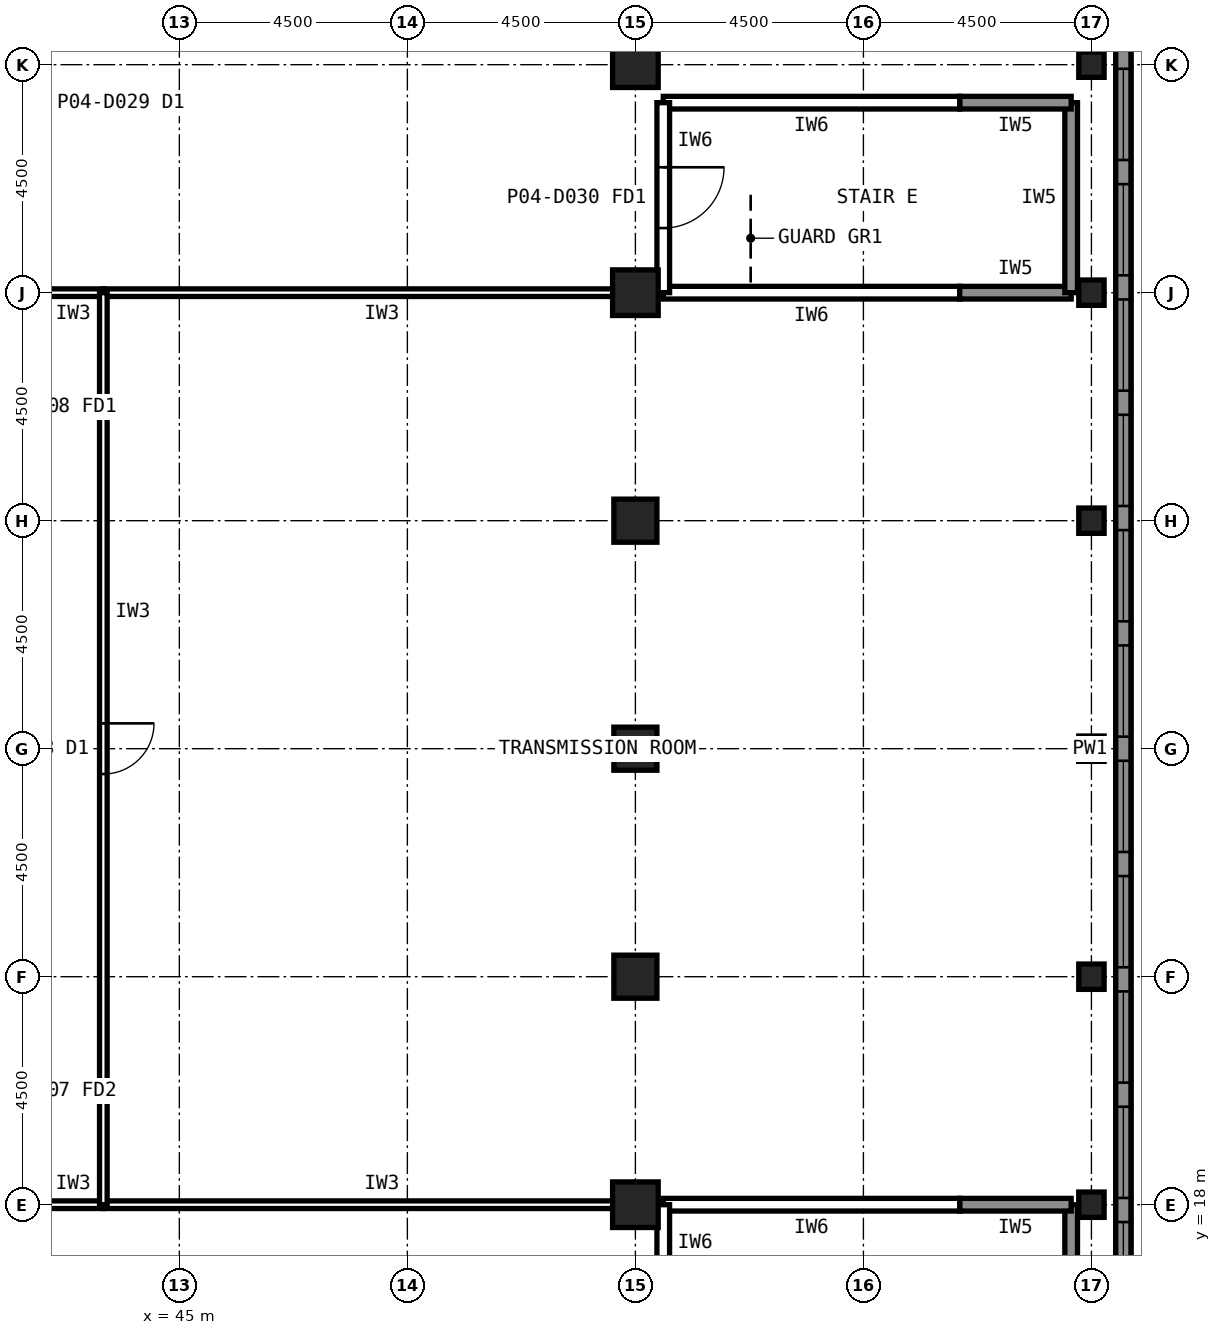
"""IFC4 building model, lengths in metres.
Left out: names, types, materials, properties, quantities, classifications, styles, units other than length and angle.
Written with IfcOpenShell. Run it as: python <this file> out.ifc"""

import sys

from ifc_helpers import new_model, si_unit, direction, frame, frame_2d, origin, origin_2d, place, context, subcontext, project, spatial, rectangle, hollow_rectangle, extrude, element, fill, save


model = new_model("IFC4")
c1 = context("Model", 3, precision=1e-05, world=origin(), true_north=direction((0.0, 1.0)))
c2 = subcontext(c1, "Body", "Model", "MODEL_VIEW")
j1 = project(units=[si_unit("LENGTHUNIT", "METRE"), si_unit("PLANEANGLEUNIT", "RADIAN")], contexts=[c1])
p1 = place(None, origin())
s1 = spatial("IfcSite", under=j1, at=p1, CompositionType="ELEMENT")
p2 = place(p1, origin())
s2 = spatial("IfcBuilding", under=s1, at=p2, CompositionType="ELEMENT")
p3 = place(p2, frame((0.0, 0.0, 18.0)))
s3 = spatial("IfcBuildingStorey", under=s2, at=p3, CompositionType="ELEMENT", Elevation=18.0)
p4 = place(p3, frame((54.0, 18.0, 0.0), z_axis=(0.0, 0.0, 1.0), x_axis=(1.0, 0.0, 0.0)))
e1 = element("IfcColumn", 1, at=p4, inside=s3, PredefinedType="COLUMN", context=c2, shape_type="SweptSolid", body=[
    extrude(hollow_rectangle(XDim=0.9, YDim=0.9, WallThickness=0.063, at=origin_2d()), origin(), (0.0, 0.0, 1.0), 5.0),
])
for number, where, z_axis, x_axis in (
    (2, (54.0, 22.5, 0.0), (0.0, 0.0, 1.0), (1.0, 0.0, 0.0)),
    (3, (54.0, 27.0, 0.0), (0.0, 0.0, 1.0), (1.0, 0.0, 0.0)),
    (4, (54.0, 31.5, 0.0), (0.0, 0.0, 1.0), (1.0, 0.0, 0.0)),
):
    element("IfcColumn", number, at=place(p3, frame(where, z_axis=z_axis, x_axis=x_axis)), inside=s3, PredefinedType="COLUMN", context=c2, shape_type="SweptSolid", body=[
        extrude(hollow_rectangle(XDim=0.85, YDim=0.85, WallThickness=0.05, at=origin_2d()), origin(), (0.0, 0.0, 1.0), 5.0),
    ])
for number, where, z_axis, x_axis in (
    (5, (54.0, 36.0, 0.0), (0.0, 0.0, 1.0), (1.0, 0.0, 0.0)),
    (6, (54.0, 40.5, 0.0), (0.0, 0.0, 1.0), (1.0, 0.0, 0.0)),
):
    element("IfcColumn", number, at=place(p3, frame(where, z_axis=z_axis, x_axis=x_axis)), inside=s3, PredefinedType="COLUMN", context=c2, shape_type="SweptSolid", body=[
        extrude(hollow_rectangle(XDim=0.9, YDim=0.9, WallThickness=0.063, at=origin_2d()), origin(), (0.0, 0.0, 1.0), 5.0),
    ])
for number, where, z_axis, x_axis in (
    (7, (63.0, 18.0, 0.0), (0.0, 0.0, 1.0), (1.0, 0.0, 0.0)),
    (8, (63.0, 22.5, 0.0), (0.0, 0.0, 1.0), (1.0, 0.0, 0.0)),
    (9, (63.0, 27.0, 0.0), (0.0, 0.0, 1.0), (1.0, 0.0, 0.0)),
    (10, (63.0, 31.5, 0.0), (0.0, 0.0, 1.0), (1.0, 0.0, 0.0)),
    (11, (63.0, 36.0, 0.0), (0.0, 0.0, 1.0), (1.0, 0.0, 0.0)),
    (12, (63.0, 40.5, 0.0), (0.0, 0.0, 1.0), (1.0, 0.0, 0.0)),
):
    element("IfcColumn", number, at=place(p3, frame(where, z_axis=z_axis, x_axis=x_axis)), inside=s3, PredefinedType="COLUMN", context=c2, shape_type="SweptSolid", body=[
        extrude(hollow_rectangle(XDim=0.5, YDim=0.5, WallThickness=0.022, at=origin_2d()), origin(), (0.0, 0.0, 1.0), 5.0),
    ])
p5 = place(p3, frame((63.63, 49.761, 0.0), z_axis=(0.0, 0.0, 1.0), x_axis=(0.0, -1.0, 0.0)))
e13 = element("IfcWall", 13, at=p5, inside=s3, PredefinedType="SOLIDWALL", context=c2, shape_type="SweptSolid", body=[
    extrude(rectangle(XDim=45.522, YDim=0.3, at=frame_2d((22.761, 0.0))), origin(), (0.0, 0.0, 1.0), 5.0),
])
p6 = place(p5, frame((2.514, 0.0, 1.1)))
e14 = element("IfcOpeningElement", 14, at=p6, cuts=e13, PredefinedType="OPENING", context=c2, shape_type="SweptSolid", body=[
    extrude(rectangle(XDim=1.8, YDim=1.2, at=frame_2d((0.9, 0.6))), frame((0.0, 0.16, 0.0), z_axis=(0.0, -1.0, 0.0), x_axis=(1.0, 0.0, 0.0)), (0.0, 0.0, 1.0), 0.32),
])
p7 = place(p5, frame((4.79, 0.0, 1.1)))
e15 = element("IfcOpeningElement", 15, at=p7, cuts=e13, PredefinedType="OPENING", context=c2, shape_type="SweptSolid", body=[
    extrude(rectangle(XDim=1.8, YDim=1.2, at=frame_2d((0.9, 0.6))), frame((0.0, 0.16, 0.0), z_axis=(0.0, -1.0, 0.0), x_axis=(1.0, 0.0, 0.0)), (0.0, 0.0, 1.0), 0.32),
])
p8 = place(p5, frame((7.066, 0.0, 1.1)))
e16 = element("IfcOpeningElement", 16, at=p8, cuts=e13, PredefinedType="OPENING", context=c2, shape_type="SweptSolid", body=[
    extrude(rectangle(XDim=1.8, YDim=1.2, at=frame_2d((0.9, 0.6))), frame((0.0, 0.16, 0.0), z_axis=(0.0, -1.0, 0.0), x_axis=(1.0, 0.0, 0.0)), (0.0, 0.0, 1.0), 0.32),
])
p9 = place(p5, frame((9.343, 0.0, 1.1)))
e17 = element("IfcOpeningElement", 17, at=p9, cuts=e13, PredefinedType="OPENING", context=c2, shape_type="SweptSolid", body=[
    extrude(rectangle(XDim=1.8, YDim=1.2, at=frame_2d((0.9, 0.6))), frame((0.0, 0.16, 0.0), z_axis=(0.0, -1.0, 0.0), x_axis=(1.0, 0.0, 0.0)), (0.0, 0.0, 1.0), 0.32),
])
p10 = place(p5, frame((11.619, 0.0, 1.1)))
e18 = element("IfcOpeningElement", 18, at=p10, cuts=e13, PredefinedType="OPENING", context=c2, shape_type="SweptSolid", body=[
    extrude(rectangle(XDim=1.8, YDim=1.2, at=frame_2d((0.9, 0.6))), frame((0.0, 0.16, 0.0), z_axis=(0.0, -1.0, 0.0), x_axis=(1.0, 0.0, 0.0)), (0.0, 0.0, 1.0), 0.32),
])
p11 = place(p5, frame((13.895, 0.0, 1.1)))
e19 = element("IfcOpeningElement", 19, at=p11, cuts=e13, PredefinedType="OPENING", context=c2, shape_type="SweptSolid", body=[
    extrude(rectangle(XDim=1.8, YDim=1.2, at=frame_2d((0.9, 0.6))), frame((0.0, 0.16, 0.0), z_axis=(0.0, -1.0, 0.0), x_axis=(1.0, 0.0, 0.0)), (0.0, 0.0, 1.0), 0.32),
])
p12 = place(p5, frame((16.171, 0.0, 1.1)))
e20 = element("IfcOpeningElement", 20, at=p12, cuts=e13, PredefinedType="OPENING", context=c2, shape_type="SweptSolid", body=[
    extrude(rectangle(XDim=1.8, YDim=1.2, at=frame_2d((0.9, 0.6))), frame((0.0, 0.16, 0.0), z_axis=(0.0, -1.0, 0.0), x_axis=(1.0, 0.0, 0.0)), (0.0, 0.0, 1.0), 0.32),
])
p13 = place(p5, frame((18.447, 0.0, 1.1)))
e21 = element("IfcOpeningElement", 21, at=p13, cuts=e13, PredefinedType="OPENING", context=c2, shape_type="SweptSolid", body=[
    extrude(rectangle(XDim=1.8, YDim=1.2, at=frame_2d((0.9, 0.6))), frame((0.0, 0.16, 0.0), z_axis=(0.0, -1.0, 0.0), x_axis=(1.0, 0.0, 0.0)), (0.0, 0.0, 1.0), 0.32),
])
p14 = place(p5, frame((20.723, 0.0, 1.1)))
e22 = element("IfcOpeningElement", 22, at=p14, cuts=e13, PredefinedType="OPENING", context=c2, shape_type="SweptSolid", body=[
    extrude(rectangle(XDim=1.8, YDim=1.2, at=frame_2d((0.9, 0.6))), frame((0.0, 0.16, 0.0), z_axis=(0.0, -1.0, 0.0), x_axis=(1.0, 0.0, 0.0)), (0.0, 0.0, 1.0), 0.32),
])
p15 = place(p5, frame((22.999, 0.0, 1.1)))
e23 = element("IfcOpeningElement", 23, at=p15, cuts=e13, PredefinedType="OPENING", context=c2, shape_type="SweptSolid", body=[
    extrude(rectangle(XDim=1.8, YDim=1.2, at=frame_2d((0.9, 0.6))), frame((0.0, 0.16, 0.0), z_axis=(0.0, -1.0, 0.0), x_axis=(1.0, 0.0, 0.0)), (0.0, 0.0, 1.0), 0.32),
])
p16 = place(p5, frame((25.275, 0.0, 1.1)))
e24 = element("IfcOpeningElement", 24, at=p16, cuts=e13, PredefinedType="OPENING", context=c2, shape_type="SweptSolid", body=[
    extrude(rectangle(XDim=1.8, YDim=1.2, at=frame_2d((0.9, 0.6))), frame((0.0, 0.16, 0.0), z_axis=(0.0, -1.0, 0.0), x_axis=(1.0, 0.0, 0.0)), (0.0, 0.0, 1.0), 0.32),
])
p17 = place(p5, frame((27.551, 0.0, 1.1)))
e25 = element("IfcOpeningElement", 25, at=p17, cuts=e13, PredefinedType="OPENING", context=c2, shape_type="SweptSolid", body=[
    extrude(rectangle(XDim=1.8, YDim=1.2, at=frame_2d((0.9, 0.6))), frame((0.0, 0.16, 0.0), z_axis=(0.0, -1.0, 0.0), x_axis=(1.0, 0.0, 0.0)), (0.0, 0.0, 1.0), 0.32),
])
p18 = place(p5, frame((29.827, 0.0, 1.1)))
e26 = element("IfcOpeningElement", 26, at=p18, cuts=e13, PredefinedType="OPENING", context=c2, shape_type="SweptSolid", body=[
    extrude(rectangle(XDim=1.8, YDim=1.2, at=frame_2d((0.9, 0.6))), frame((0.0, 0.16, 0.0), z_axis=(0.0, -1.0, 0.0), x_axis=(1.0, 0.0, 0.0)), (0.0, 0.0, 1.0), 0.32),
])
p19 = place(p5, frame((32.104, 0.0, 1.1)))
e27 = element("IfcOpeningElement", 27, at=p19, cuts=e13, PredefinedType="OPENING", context=c2, shape_type="SweptSolid", body=[
    extrude(rectangle(XDim=1.8, YDim=1.2, at=frame_2d((0.9, 0.6))), frame((0.0, 0.16, 0.0), z_axis=(0.0, -1.0, 0.0), x_axis=(1.0, 0.0, 0.0)), (0.0, 0.0, 1.0), 0.32),
])
p20 = place(p5, frame((34.38, 0.0, 1.1)))
e28 = element("IfcOpeningElement", 28, at=p20, cuts=e13, PredefinedType="OPENING", context=c2, shape_type="SweptSolid", body=[
    extrude(rectangle(XDim=1.8, YDim=1.2, at=frame_2d((0.9, 0.6))), frame((0.0, 0.16, 0.0), z_axis=(0.0, -1.0, 0.0), x_axis=(1.0, 0.0, 0.0)), (0.0, 0.0, 1.0), 0.32),
])
p21 = place(p5, frame((36.656, 0.0, 1.1)))
e29 = element("IfcOpeningElement", 29, at=p21, cuts=e13, PredefinedType="OPENING", context=c2, shape_type="SweptSolid", body=[
    extrude(rectangle(XDim=1.8, YDim=1.2, at=frame_2d((0.9, 0.6))), frame((0.0, 0.16, 0.0), z_axis=(0.0, -1.0, 0.0), x_axis=(1.0, 0.0, 0.0)), (0.0, 0.0, 1.0), 0.32),
])
p22 = place(p5, frame((38.932, 0.0, 1.1)))
e30 = element("IfcOpeningElement", 30, at=p22, cuts=e13, PredefinedType="OPENING", context=c2, shape_type="SweptSolid", body=[
    extrude(rectangle(XDim=1.8, YDim=1.2, at=frame_2d((0.9, 0.6))), frame((0.0, 0.16, 0.0), z_axis=(0.0, -1.0, 0.0), x_axis=(1.0, 0.0, 0.0)), (0.0, 0.0, 1.0), 0.32),
])
p23 = place(p5, frame((41.208, 0.0, 1.1)))
e31 = element("IfcOpeningElement", 31, at=p23, cuts=e13, PredefinedType="OPENING", context=c2, shape_type="SweptSolid", body=[
    extrude(rectangle(XDim=1.8, YDim=1.2, at=frame_2d((0.9, 0.6))), frame((0.0, 0.16, 0.0), z_axis=(0.0, -1.0, 0.0), x_axis=(1.0, 0.0, 0.0)), (0.0, 0.0, 1.0), 0.32),
])
for number, where, z_axis, x_axis in (
    (32, (42.3, 18.0, 0.0), (0.0, 0.0, 1.0), (1.0, 0.0, 0.0)),
    (33, (43.51, 36.0, 0.0), (0.0, 0.0, 1.0), (-1.0, 0.0, 0.0)),
):
    element("IfcWall", number, at=place(p3, frame(where, z_axis=z_axis, x_axis=x_axis)), inside=s3, PredefinedType="PARTITIONING", context=c2, shape_type="SweptSolid", body=[
        extrude(rectangle(XDim=1.21, YDim=0.15, at=frame_2d((0.605, 0.0))), origin(), (0.0, 0.0, 1.0), 3.682),
    ])
for number, where, z_axis, x_axis in (
    (34, (43.5, 18.0, 0.0), (0.0, 0.0, 1.0), (1.0, 0.0, 0.0)),
    (35, (54.5, 36.0, 0.0), (0.0, 0.0, 1.0), (-1.0, 0.0, 0.0)),
):
    element("IfcWall", number, at=place(p3, frame(where, z_axis=z_axis, x_axis=x_axis)), inside=s3, PredefinedType="PARTITIONING", context=c2, shape_type="SweptSolid", body=[
        extrude(rectangle(XDim=11.0, YDim=0.15, at=frame_2d((5.5, 0.0))), origin(), (0.0, 0.0, 1.0), 3.682),
    ])
p24 = place(p3, frame((43.5, 36.0, 0.0), z_axis=(0.0, 0.0, 1.0), x_axis=(0.0, -1.0, 0.0)))
e36 = element("IfcWall", 36, at=p24, inside=s3, PredefinedType="PARTITIONING", context=c2, shape_type="SweptSolid", body=[
    extrude(rectangle(XDim=18.0, YDim=0.15, at=frame_2d((9.0, 0.0))), origin(), (0.0, 0.0, 1.0), 4.8),
])
p25 = place(p24, frame((8.5, 0.0, 0.0)))
e37 = element("IfcOpeningElement", 37, at=p25, cuts=e36, PredefinedType="OPENING", context=c2, shape_type="SweptSolid", body=[
    extrude(rectangle(XDim=1.0, YDim=2.1, at=frame_2d((0.5, 1.05))), frame((0.0, 0.085, 0.0), z_axis=(0.0, -1.0, 0.0), x_axis=(1.0, 0.0, 0.0)), (0.0, 0.0, 1.0), 0.17),
])
p26 = place(p3, frame((62.6, 14.25, 0.0), z_axis=(0.0, 0.0, 1.0), x_axis=(0.0, 1.0, 0.0)))
e38 = element("IfcWall", 38, at=p26, inside=s3, PredefinedType="SOLIDWALL", context=c2, shape_type="SweptSolid", body=[
    extrude(rectangle(XDim=3.75, YDim=0.25, at=frame_2d((1.875, 0.0))), origin(), (0.0, 0.0, 1.0), 4.8),
])
p27 = place(p3, frame((62.6, 18.0, 0.0), z_axis=(0.0, 0.0, 1.0), x_axis=(-1.0, 0.0, 0.0)))
e39 = element("IfcWall", 39, at=p27, inside=s3, PredefinedType="SOLIDWALL", context=c2, shape_type="SweptSolid", body=[
    extrude(rectangle(XDim=2.2, YDim=0.25, at=frame_2d((1.1, 0.0))), origin(), (0.0, 0.0, 1.0), 4.189),
])
p28 = place(p3, frame((60.4, 18.0, 0.0), z_axis=(0.0, 0.0, 1.0), x_axis=(-1.0, 0.0, 0.0)))
e40 = element("IfcWall", 40, at=p28, inside=s3, PredefinedType="PARTITIONING", context=c2, shape_type="SweptSolid", body=[
    extrude(rectangle(XDim=5.85, YDim=0.25, at=frame_2d((2.925, 0.0))), origin(), (0.0, 0.0, 1.0), 4.189),
])
p29 = place(p3, frame((54.55, 18.0, 0.0), z_axis=(0.0, 0.0, 1.0), x_axis=(0.0, -1.0, 0.0)))
e41 = element("IfcWall", 41, at=p29, inside=s3, PredefinedType="PARTITIONING", context=c2, shape_type="SweptSolid", body=[
    extrude(rectangle(XDim=3.75, YDim=0.25, at=frame_2d((1.875, 0.0))), origin(), (0.0, 0.0, 1.0), 4.8),
])
p30 = place(p29, frame((1.275, 0.0, 0.0)))
e42 = element("IfcOpeningElement", 42, at=p30, cuts=e41, PredefinedType="OPENING", context=c2, shape_type="SweptSolid", body=[
    extrude(rectangle(XDim=1.2, YDim=2.1, at=frame_2d((0.6, 1.05))), frame((0.0, 0.135, 0.0), z_axis=(0.0, -1.0, 0.0), x_axis=(1.0, 0.0, 0.0)), (0.0, 0.0, 1.0), 0.27),
])
p31 = place(p3, frame((54.55, 36.0, 0.0), z_axis=(0.0, 0.0, 1.0), x_axis=(1.0, 0.0, 0.0)))
e43 = element("IfcWall", 43, at=p31, inside=s3, PredefinedType="PARTITIONING", context=c2, shape_type="SweptSolid", body=[
    extrude(rectangle(XDim=5.85, YDim=0.25, at=frame_2d((2.925, 0.0))), origin(), (0.0, 0.0, 1.0), 4.189),
])
p32 = place(p3, frame((60.4, 36.0, 0.0), z_axis=(0.0, 0.0, 1.0), x_axis=(1.0, 0.0, 0.0)))
e44 = element("IfcWall", 44, at=p32, inside=s3, PredefinedType="SOLIDWALL", context=c2, shape_type="SweptSolid", body=[
    extrude(rectangle(XDim=2.2, YDim=0.25, at=frame_2d((1.1, 0.0))), origin(), (0.0, 0.0, 1.0), 4.189),
])
p33 = place(p3, frame((62.6, 36.0, 0.0), z_axis=(0.0, 0.0, 1.0), x_axis=(0.0, 1.0, 0.0)))
e45 = element("IfcWall", 45, at=p33, inside=s3, PredefinedType="SOLIDWALL", context=c2, shape_type="SweptSolid", body=[
    extrude(rectangle(XDim=3.75, YDim=0.25, at=frame_2d((1.875, 0.0))), origin(), (0.0, 0.0, 1.0), 4.8),
])
p34 = place(p3, frame((62.6, 39.75, 0.0), z_axis=(0.0, 0.0, 1.0), x_axis=(-1.0, 0.0, 0.0)))
e46 = element("IfcWall", 46, at=p34, inside=s3, PredefinedType="SOLIDWALL", context=c2, shape_type="SweptSolid", body=[
    extrude(rectangle(XDim=2.2, YDim=0.25, at=frame_2d((1.1, 0.0))), origin(), (0.0, 0.0, 1.0), 4.8),
])
p35 = place(p3, frame((60.4, 39.75, 0.0), z_axis=(0.0, 0.0, 1.0), x_axis=(-1.0, 0.0, 0.0)))
e47 = element("IfcWall", 47, at=p35, inside=s3, PredefinedType="PARTITIONING", context=c2, shape_type="SweptSolid", body=[
    extrude(rectangle(XDim=5.85, YDim=0.25, at=frame_2d((2.925, 0.0))), origin(), (0.0, 0.0, 1.0), 4.8),
])
p36 = place(p3, frame((54.55, 39.75, 0.0), z_axis=(0.0, 0.0, 1.0), x_axis=(0.0, -1.0, 0.0)))
e48 = element("IfcWall", 48, at=p36, inside=s3, PredefinedType="PARTITIONING", context=c2, shape_type="SweptSolid", body=[
    extrude(rectangle(XDim=3.75, YDim=0.25, at=frame_2d((1.875, 0.0))), origin(), (0.0, 0.0, 1.0), 4.8),
])
p37 = place(p36, frame((1.275, 0.0, 0.0)))
e49 = element("IfcOpeningElement", 49, at=p37, cuts=e48, PredefinedType="OPENING", context=c2, shape_type="SweptSolid", body=[
    extrude(rectangle(XDim=1.2, YDim=2.1, at=frame_2d((0.6, 1.05))), frame((0.0, 0.135, 0.0), z_axis=(0.0, -1.0, 0.0), x_axis=(1.0, 0.0, 0.0)), (0.0, 0.0, 1.0), 0.27),
])
p38 = place(p3, frame((63.63, 49.761, 5.0), z_axis=(0.0, 0.0, 1.0), x_axis=(0.0, -1.0, 0.0)))
e50 = element("IfcWall", 50, at=p38, inside=s3, PredefinedType="PARAPET", context=c2, shape_type="SweptSolid", body=[
    extrude(rectangle(XDim=45.522, YDim=0.3, at=frame_2d((22.761, 0.0))), origin(), (0.0, 0.0, 1.0), 1.1),
])
p39 = place(p9, origin())
e51 = element("IfcWindow", 51, at=p39, inside=s3, PartitioningType="SINGLE_PANEL", PredefinedType="WINDOW", context=c2, shape_type="SweptSolid", body=[
    extrude(rectangle(XDim=1.8, YDim=1.2, at=frame_2d((0.9, 0.6))), frame((0.0, 0.03, 0.0), z_axis=(0.0, -1.0, 0.0), x_axis=(1.0, 0.0, 0.0)), (0.0, 0.0, 1.0), 0.06),
])
fill(e17, e51)
p40 = place(p10, origin())
e52 = element("IfcWindow", 52, at=p40, inside=s3, PartitioningType="SINGLE_PANEL", PredefinedType="WINDOW", context=c2, shape_type="SweptSolid", body=[
    extrude(rectangle(XDim=1.8, YDim=1.2, at=frame_2d((0.9, 0.6))), frame((0.0, 0.03, 0.0), z_axis=(0.0, -1.0, 0.0), x_axis=(1.0, 0.0, 0.0)), (0.0, 0.0, 1.0), 0.06),
])
fill(e18, e52)
p41 = place(p11, origin())
e53 = element("IfcWindow", 53, at=p41, inside=s3, PartitioningType="SINGLE_PANEL", PredefinedType="WINDOW", context=c2, shape_type="SweptSolid", body=[
    extrude(rectangle(XDim=1.8, YDim=1.2, at=frame_2d((0.9, 0.6))), frame((0.0, 0.03, 0.0), z_axis=(0.0, -1.0, 0.0), x_axis=(1.0, 0.0, 0.0)), (0.0, 0.0, 1.0), 0.06),
])
fill(e19, e53)
p42 = place(p12, origin())
e54 = element("IfcWindow", 54, at=p42, inside=s3, PartitioningType="SINGLE_PANEL", PredefinedType="WINDOW", context=c2, shape_type="SweptSolid", body=[
    extrude(rectangle(XDim=1.8, YDim=1.2, at=frame_2d((0.9, 0.6))), frame((0.0, 0.03, 0.0), z_axis=(0.0, -1.0, 0.0), x_axis=(1.0, 0.0, 0.0)), (0.0, 0.0, 1.0), 0.06),
])
fill(e20, e54)
p43 = place(p13, origin())
e55 = element("IfcWindow", 55, at=p43, inside=s3, PartitioningType="SINGLE_PANEL", PredefinedType="WINDOW", context=c2, shape_type="SweptSolid", body=[
    extrude(rectangle(XDim=1.8, YDim=1.2, at=frame_2d((0.9, 0.6))), frame((0.0, 0.03, 0.0), z_axis=(0.0, -1.0, 0.0), x_axis=(1.0, 0.0, 0.0)), (0.0, 0.0, 1.0), 0.06),
])
fill(e21, e55)
p44 = place(p14, origin())
e56 = element("IfcWindow", 56, at=p44, inside=s3, PartitioningType="SINGLE_PANEL", PredefinedType="WINDOW", context=c2, shape_type="SweptSolid", body=[
    extrude(rectangle(XDim=1.8, YDim=1.2, at=frame_2d((0.9, 0.6))), frame((0.0, 0.03, 0.0), z_axis=(0.0, -1.0, 0.0), x_axis=(1.0, 0.0, 0.0)), (0.0, 0.0, 1.0), 0.06),
])
fill(e22, e56)
p45 = place(p15, origin())
e57 = element("IfcWindow", 57, at=p45, inside=s3, PartitioningType="SINGLE_PANEL", PredefinedType="WINDOW", context=c2, shape_type="SweptSolid", body=[
    extrude(rectangle(XDim=1.8, YDim=1.2, at=frame_2d((0.9, 0.6))), frame((0.0, 0.03, 0.0), z_axis=(0.0, -1.0, 0.0), x_axis=(1.0, 0.0, 0.0)), (0.0, 0.0, 1.0), 0.06),
])
fill(e23, e57)
p46 = place(p16, origin())
e58 = element("IfcWindow", 58, at=p46, inside=s3, PartitioningType="SINGLE_PANEL", PredefinedType="WINDOW", context=c2, shape_type="SweptSolid", body=[
    extrude(rectangle(XDim=1.8, YDim=1.2, at=frame_2d((0.9, 0.6))), frame((0.0, 0.03, 0.0), z_axis=(0.0, -1.0, 0.0), x_axis=(1.0, 0.0, 0.0)), (0.0, 0.0, 1.0), 0.06),
])
fill(e24, e58)
p47 = place(p17, origin())
e59 = element("IfcWindow", 59, at=p47, inside=s3, PartitioningType="SINGLE_PANEL", PredefinedType="WINDOW", context=c2, shape_type="SweptSolid", body=[
    extrude(rectangle(XDim=1.8, YDim=1.2, at=frame_2d((0.9, 0.6))), frame((0.0, 0.03, 0.0), z_axis=(0.0, -1.0, 0.0), x_axis=(1.0, 0.0, 0.0)), (0.0, 0.0, 1.0), 0.06),
])
fill(e25, e59)
p48 = place(p18, origin())
e60 = element("IfcWindow", 60, at=p48, inside=s3, PartitioningType="SINGLE_PANEL", PredefinedType="WINDOW", context=c2, shape_type="SweptSolid", body=[
    extrude(rectangle(XDim=1.8, YDim=1.2, at=frame_2d((0.9, 0.6))), frame((0.0, 0.03, 0.0), z_axis=(0.0, -1.0, 0.0), x_axis=(1.0, 0.0, 0.0)), (0.0, 0.0, 1.0), 0.06),
])
fill(e26, e60)
p49 = place(p19, origin())
e61 = element("IfcWindow", 61, at=p49, inside=s3, PartitioningType="SINGLE_PANEL", PredefinedType="WINDOW", context=c2, shape_type="SweptSolid", body=[
    extrude(rectangle(XDim=1.8, YDim=1.2, at=frame_2d((0.9, 0.6))), frame((0.0, 0.03, 0.0), z_axis=(0.0, -1.0, 0.0), x_axis=(1.0, 0.0, 0.0)), (0.0, 0.0, 1.0), 0.06),
])
fill(e27, e61)
p50 = place(p25, origin())
e62 = element("IfcDoor", 62, at=p50, inside=s3, OperationType="SINGLE_SWING_LEFT", PredefinedType="DOOR", context=c2, shape_type="SweptSolid", body=[
    extrude(rectangle(XDim=1.0, YDim=2.1, at=frame_2d((0.5, 1.05))), frame((0.0, 0.025, 0.0), z_axis=(0.0, -1.0, 0.0), x_axis=(1.0, 0.0, 0.0)), (0.0, 0.0, 1.0), 0.05),
])
fill(e37, e62)
p51 = place(p37, origin())
e63 = element("IfcDoor", 63, at=p51, inside=s3, OperationType="SINGLE_SWING_LEFT", PredefinedType="DOOR", context=c2, shape_type="SweptSolid", body=[
    extrude(rectangle(XDim=1.2, YDim=2.1, at=frame_2d((0.6, 1.05))), frame((0.0, 0.025, 0.0), z_axis=(0.0, -1.0, 0.0), x_axis=(1.0, 0.0, 0.0)), (0.0, 0.0, 1.0), 0.05),
])
fill(e49, e63)
save(model, sys.argv[1])
